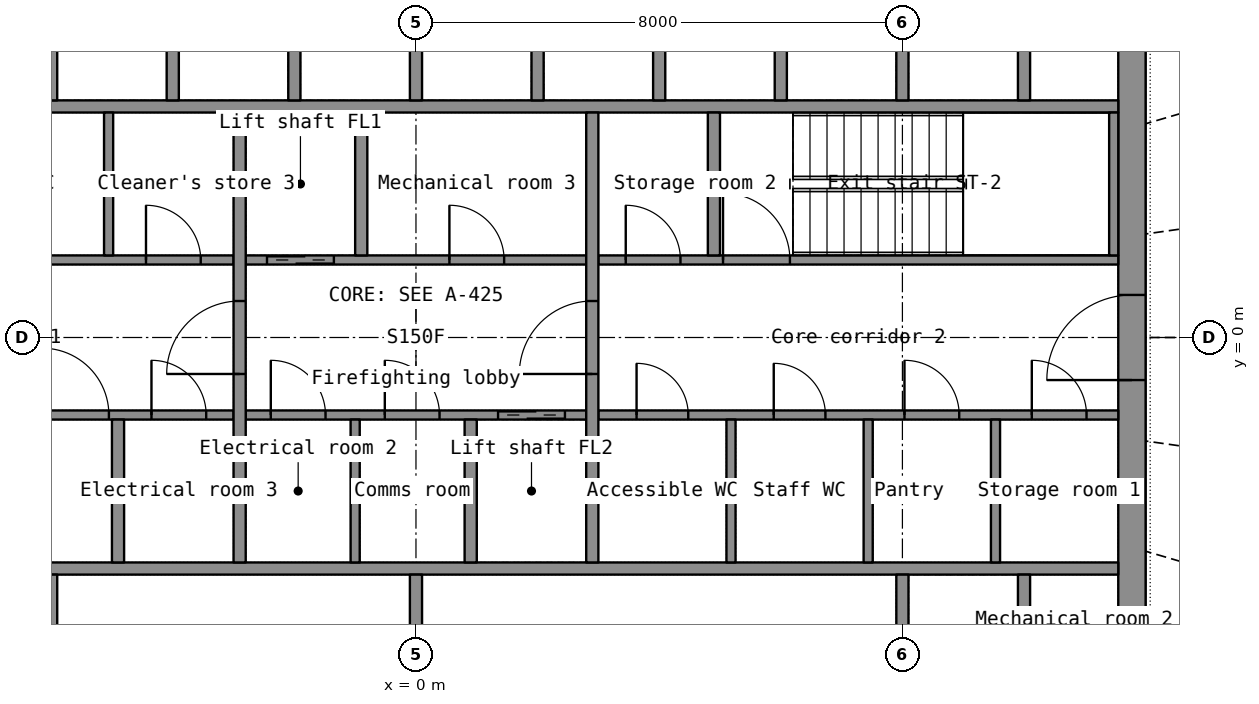
"""IFC4 building model, lengths in metres.
Left out: names, types, materials, properties, quantities, classifications, styles, units other than length and angle.
Written with IfcOpenShell. Run it as: python <this file> out.ifc"""

import sys

from ifc_helpers import new_model, si_unit, direction, frame, frame_2d, origin, place, context, subcontext, project, spatial, rectangle, extrude, element, fill, save


model = new_model("IFC4")
c1 = context("Model", 3, precision=1e-05, world=origin(), true_north=direction((0.0, 1.0)))
c2 = subcontext(c1, "Body", "Model", "MODEL_VIEW")
j1 = project(units=[si_unit("LENGTHUNIT", "METRE"), si_unit("PLANEANGLEUNIT", "RADIAN")], contexts=[c1])
p1 = place(None, origin())
s1 = spatial("IfcSite", under=j1, at=p1, CompositionType="ELEMENT")
p2 = place(p1, origin())
s2 = spatial("IfcBuilding", under=s1, at=p2, CompositionType="ELEMENT")
p3 = place(p2, frame((0.0, 0.0, 197.8)))
s3 = spatial("IfcBuildingStorey", under=s2, at=p3, CompositionType="ELEMENT", Elevation=197.8)
p4 = place(p3, frame((11.775, -7.2, 0.0), z_axis=(0.0, 0.0, 1.0), x_axis=(0.0, 1.0, 0.0)))
e1 = element("IfcWall", 1, at=p4, inside=s3, PredefinedType="SHEAR", context=c2, shape_type="SweptSolid", body=[
    extrude(rectangle(XDim=14.4, YDim=0.45, at=frame_2d((7.2, 0.0))), origin(), (0.0, 0.0, 1.0), 3.3),
])
p5 = place(p4, frame((6.5, 0.0, 0.0)))
e2 = element("IfcOpeningElement", 2, at=p5, cuts=e1, PredefinedType="OPENING", context=c2, shape_type="SweptSolid", body=[
    extrude(rectangle(XDim=1.4, YDim=2.2, at=frame_2d((0.7, 1.1))), frame((0.0, 0.235, 0.0), z_axis=(0.0, -1.0, 0.0), x_axis=(1.0, 0.0, 0.0)), (0.0, 0.0, 1.0), 0.47),
])
for number, where, z_axis, x_axis in (
    (3, (-11.55, -3.8, 0.0), (0.0, 0.0, 1.0), (1.0, 0.0, 0.0)),
    (4, (-11.55, 3.8, 0.0), (0.0, 0.0, 1.0), (1.0, 0.0, 0.0)),
):
    element("IfcWall", number, at=place(p3, frame(where, z_axis=z_axis, x_axis=x_axis)), inside=s3, PredefinedType="SHEAR", context=c2, shape_type="SweptSolid", body=[
        extrude(rectangle(XDim=23.1, YDim=0.2, at=frame_2d((11.55, 0.0))), origin(), (0.0, 0.0, 1.0), 3.3),
    ])
for number, where, z_axis, x_axis in (
    (5, (8.0, -6.75, 0.0), (0.0, 0.0, 1.0), (0.0, 1.0, 0.0)),
    (6, (10.0, -6.75, 0.0), (0.0, 0.0, 1.0), (0.0, 1.0, 0.0)),
):
    element("IfcWall", number, at=place(p3, frame(where, z_axis=z_axis, x_axis=x_axis)), inside=s3, PredefinedType="SHEAR", context=c2, shape_type="SweptSolid", body=[
        extrude(rectangle(XDim=2.85, YDim=0.2, at=frame_2d((1.425, 0.0))), origin(), (0.0, 0.0, 1.0), 3.3),
    ])
for number, where, z_axis, x_axis in (
    (7, (-6.0, -6.75, 0.0), (0.0, 0.0, 1.0), (0.0, 1.0, 0.0)),
    (8, (0.0, -6.75, 0.0), (0.0, 0.0, 1.0), (0.0, 1.0, 0.0)),
):
    element("IfcWall", number, at=place(p3, frame(where, z_axis=z_axis, x_axis=x_axis)), inside=s3, PredefinedType="PARTITIONING", context=c2, shape_type="SweptSolid", body=[
        extrude(rectangle(XDim=2.85, YDim=0.2, at=frame_2d((1.425, 0.0))), origin(), (0.0, 0.0, 1.0), 3.3),
    ])
for number, where, z_axis, x_axis in (
    (9, (-6.0, 3.9, 0.0), (0.0, 0.0, 1.0), (0.0, 1.0, 0.0)),
    (10, (-4.0, 3.9, 0.0), (0.0, 0.0, 1.0), (0.0, 1.0, 0.0)),
    (11, (-2.0, 3.9, 0.0), (0.0, 0.0, 1.0), (0.0, 1.0, 0.0)),
    (12, (0.0, 3.9, 0.0), (0.0, 0.0, 1.0), (0.0, 1.0, 0.0)),
    (13, (2.0, 3.9, 0.0), (0.0, 0.0, 1.0), (0.0, 1.0, 0.0)),
    (14, (4.0, 3.9, 0.0), (0.0, 0.0, 1.0), (0.0, 1.0, 0.0)),
    (15, (6.0, 3.9, 0.0), (0.0, 0.0, 1.0), (0.0, 1.0, 0.0)),
    (16, (8.0, 3.9, 0.0), (0.0, 0.0, 1.0), (0.0, 1.0, 0.0)),
    (17, (10.0, 3.9, 0.0), (0.0, 0.0, 1.0), (0.0, 1.0, 0.0)),
):
    element("IfcWall", number, at=place(p3, frame(where, z_axis=z_axis, x_axis=x_axis)), inside=s3, PredefinedType="SHEAR", context=c2, shape_type="SweptSolid", body=[
        extrude(rectangle(XDim=2.85, YDim=0.2, at=frame_2d((1.425, 0.0))), origin(), (0.0, 0.0, 1.0), 3.3),
    ])
p6 = place(p3, frame((-11.55, -1.275, 0.0), z_axis=(0.0, 0.0, 1.0), x_axis=(1.0, 0.0, 0.0)))
e18 = element("IfcWall", 18, at=p6, inside=s3, PredefinedType="SHEAR", context=c2, shape_type="SweptSolid", body=[
    extrude(rectangle(XDim=8.55, YDim=0.15, at=frame_2d((4.275, 0.0))), origin(), (0.0, 0.0, 1.0), 3.3),
])
p7 = place(p6, frame((5.4, 0.0, 0.0)))
e19 = element("IfcOpeningElement", 19, at=p7, cuts=e18, PredefinedType="OPENING", context=c2, shape_type="SweptSolid", body=[
    extrude(rectangle(XDim=1.1, YDim=2.15, at=frame_2d((0.55, 1.075))), frame((0.0, 0.085, 0.0), z_axis=(0.0, -1.0, 0.0), x_axis=(1.0, 0.0, 0.0)), (0.0, 0.0, 1.0), 0.17),
])
p8 = place(p6, frame((7.2, 0.0, 0.0)))
e20 = element("IfcOpeningElement", 20, at=p8, cuts=e18, PredefinedType="OPENING", context=c2, shape_type="SweptSolid", body=[
    extrude(rectangle(XDim=0.9, YDim=2.1, at=frame_2d((0.45, 1.05))), frame((0.0, 0.085, 0.0), z_axis=(0.0, -1.0, 0.0), x_axis=(1.0, 0.0, 0.0)), (0.0, 0.0, 1.0), 0.17),
])
p9 = place(p3, frame((-2.8, -1.275, 0.0), z_axis=(0.0, 0.0, 1.0), x_axis=(1.0, 0.0, 0.0)))
e21 = element("IfcWall", 21, at=p9, inside=s3, PredefinedType="SHEAR", context=c2, shape_type="SweptSolid", body=[
    extrude(rectangle(XDim=5.6, YDim=0.15, at=frame_2d((2.8, 0.0))), origin(), (0.0, 0.0, 1.0), 3.3),
])
p10 = place(p9, frame((4.15, 0.0, 0.0)))
e22 = element("IfcOpeningElement", 22, at=p10, cuts=e21, PredefinedType="OPENING", context=c2, shape_type="SweptSolid", body=[
    extrude(rectangle(XDim=1.1, YDim=2.2, at=frame_2d((0.55, 1.1))), frame((0.0, 0.085, 0.0), z_axis=(0.0, -1.0, 0.0), x_axis=(1.0, 0.0, 0.0)), (0.0, 0.0, 1.0), 0.17),
])
p11 = place(p9, frame((0.413, 0.0, 0.0)))
e23 = element("IfcOpeningElement", 23, at=p11, cuts=e21, PredefinedType="OPENING", context=c2, shape_type="SweptSolid", body=[
    extrude(rectangle(XDim=0.9, YDim=2.1, at=frame_2d((0.45, 1.05))), frame((0.0, 0.085, 0.0), z_axis=(0.0, -1.0, 0.0), x_axis=(1.0, 0.0, 0.0)), (0.0, 0.0, 1.0), 0.17),
])
p12 = place(p9, frame((2.288, 0.0, 0.0)))
e24 = element("IfcOpeningElement", 24, at=p12, cuts=e21, PredefinedType="OPENING", context=c2, shape_type="SweptSolid", body=[
    extrude(rectangle(XDim=0.9, YDim=2.1, at=frame_2d((0.45, 1.05))), frame((0.0, 0.085, 0.0), z_axis=(0.0, -1.0, 0.0), x_axis=(1.0, 0.0, 0.0)), (0.0, 0.0, 1.0), 0.17),
])
p13 = place(p3, frame((3.0, -1.275, 0.0), z_axis=(0.0, 0.0, 1.0), x_axis=(1.0, 0.0, 0.0)))
e25 = element("IfcWall", 25, at=p13, inside=s3, PredefinedType="PARTITIONING", context=c2, shape_type="SweptSolid", body=[
    extrude(rectangle(XDim=8.55, YDim=0.15, at=frame_2d((4.275, 0.0))), origin(), (0.0, 0.0, 1.0), 3.3),
])
p14 = place(p13, frame((0.628, 0.0, 0.0)))
e26 = element("IfcOpeningElement", 26, at=p14, cuts=e25, PredefinedType="OPENING", context=c2, shape_type="SweptSolid", body=[
    extrude(rectangle(XDim=0.85, YDim=2.1, at=frame_2d((0.425, 1.05))), frame((0.0, 0.085, 0.0), z_axis=(0.0, -1.0, 0.0), x_axis=(1.0, 0.0, 0.0)), (0.0, 0.0, 1.0), 0.17),
])
p15 = place(p13, frame((2.884, 0.0, 0.0)))
e27 = element("IfcOpeningElement", 27, at=p15, cuts=e25, PredefinedType="OPENING", context=c2, shape_type="SweptSolid", body=[
    extrude(rectangle(XDim=0.85, YDim=2.1, at=frame_2d((0.425, 1.05))), frame((0.0, 0.085, 0.0), z_axis=(0.0, -1.0, 0.0), x_axis=(1.0, 0.0, 0.0)), (0.0, 0.0, 1.0), 0.17),
])
p16 = place(p13, frame((5.034, 0.0, 0.0)))
e28 = element("IfcOpeningElement", 28, at=p16, cuts=e25, PredefinedType="OPENING", context=c2, shape_type="SweptSolid", body=[
    extrude(rectangle(XDim=0.9, YDim=2.1, at=frame_2d((0.45, 1.05))), frame((0.0, 0.085, 0.0), z_axis=(0.0, -1.0, 0.0), x_axis=(1.0, 0.0, 0.0)), (0.0, 0.0, 1.0), 0.17),
])
p17 = place(p13, frame((7.128, 0.0, 0.0)))
e29 = element("IfcOpeningElement", 29, at=p17, cuts=e25, PredefinedType="OPENING", context=c2, shape_type="SweptSolid", body=[
    extrude(rectangle(XDim=0.9, YDim=2.1, at=frame_2d((0.45, 1.05))), frame((0.0, 0.085, 0.0), z_axis=(0.0, -1.0, 0.0), x_axis=(1.0, 0.0, 0.0)), (0.0, 0.0, 1.0), 0.17),
])
p18 = place(p3, frame((-11.55, 1.275, 0.0), z_axis=(0.0, 0.0, 1.0), x_axis=(1.0, 0.0, 0.0)))
e30 = element("IfcWall", 30, at=p18, inside=s3, PredefinedType="PARTITIONING", context=c2, shape_type="SweptSolid", body=[
    extrude(rectangle(XDim=8.55, YDim=0.15, at=frame_2d((4.275, 0.0))), origin(), (0.0, 0.0, 1.0), 3.3),
])
p19 = place(p18, frame((1.143, 0.0, 0.0)))
e31 = element("IfcOpeningElement", 31, at=p19, cuts=e30, PredefinedType="OPENING", context=c2, shape_type="SweptSolid", body=[
    extrude(rectangle(XDim=0.85, YDim=2.1, at=frame_2d((0.425, 1.05))), frame((0.0, 0.085, 0.0), z_axis=(0.0, -1.0, 0.0), x_axis=(1.0, 0.0, 0.0)), (0.0, 0.0, 1.0), 0.17),
])
p20 = place(p18, frame((4.427, 0.0, 0.0)))
e32 = element("IfcOpeningElement", 32, at=p20, cuts=e30, PredefinedType="OPENING", context=c2, shape_type="SweptSolid", body=[
    extrude(rectangle(XDim=0.85, YDim=2.1, at=frame_2d((0.425, 1.05))), frame((0.0, 0.085, 0.0), z_axis=(0.0, -1.0, 0.0), x_axis=(1.0, 0.0, 0.0)), (0.0, 0.0, 1.0), 0.17),
])
p21 = place(p18, frame((7.11, 0.0, 0.0)))
e33 = element("IfcOpeningElement", 33, at=p21, cuts=e30, PredefinedType="OPENING", context=c2, shape_type="SweptSolid", body=[
    extrude(rectangle(XDim=0.9, YDim=2.1, at=frame_2d((0.45, 1.05))), frame((0.0, 0.085, 0.0), z_axis=(0.0, -1.0, 0.0), x_axis=(1.0, 0.0, 0.0)), (0.0, 0.0, 1.0), 0.17),
])
p22 = place(p3, frame((-2.8, 1.275, 0.0), z_axis=(0.0, 0.0, 1.0), x_axis=(1.0, 0.0, 0.0)))
e34 = element("IfcWall", 34, at=p22, inside=s3, PredefinedType="SHEAR", context=c2, shape_type="SweptSolid", body=[
    extrude(rectangle(XDim=5.6, YDim=0.15, at=frame_2d((2.8, 0.0))), origin(), (0.0, 0.0, 1.0), 3.3),
])
p23 = place(p22, frame((0.35, 0.0, 0.0)))
e35 = element("IfcOpeningElement", 35, at=p23, cuts=e34, PredefinedType="OPENING", context=c2, shape_type="SweptSolid", body=[
    extrude(rectangle(XDim=1.1, YDim=2.2, at=frame_2d((0.55, 1.1))), frame((0.0, 0.085, 0.0), z_axis=(0.0, -1.0, 0.0), x_axis=(1.0, 0.0, 0.0)), (0.0, 0.0, 1.0), 0.17),
])
p24 = place(p22, frame((3.35, 0.0, 0.0)))
e36 = element("IfcOpeningElement", 36, at=p24, cuts=e34, PredefinedType="OPENING", context=c2, shape_type="SweptSolid", body=[
    extrude(rectangle(XDim=0.9, YDim=2.1, at=frame_2d((0.45, 1.05))), frame((0.0, 0.085, 0.0), z_axis=(0.0, -1.0, 0.0), x_axis=(1.0, 0.0, 0.0)), (0.0, 0.0, 1.0), 0.17),
])
p25 = place(p3, frame((3.0, 1.275, 0.0), z_axis=(0.0, 0.0, 1.0), x_axis=(1.0, 0.0, 0.0)))
e37 = element("IfcWall", 37, at=p25, inside=s3, PredefinedType="SHEAR", context=c2, shape_type="SweptSolid", body=[
    extrude(rectangle(XDim=8.55, YDim=0.15, at=frame_2d((4.275, 0.0))), origin(), (0.0, 0.0, 1.0), 3.3),
])
p26 = place(p25, frame((2.05, 0.0, 0.0)))
e38 = element("IfcOpeningElement", 38, at=p26, cuts=e37, PredefinedType="OPENING", context=c2, shape_type="SweptSolid", body=[
    extrude(rectangle(XDim=1.1, YDim=2.15, at=frame_2d((0.55, 1.075))), frame((0.0, 0.085, 0.0), z_axis=(0.0, -1.0, 0.0), x_axis=(1.0, 0.0, 0.0)), (0.0, 0.0, 1.0), 0.17),
])
p27 = place(p25, frame((0.45, 0.0, 0.0)))
e39 = element("IfcOpeningElement", 39, at=p27, cuts=e37, PredefinedType="OPENING", context=c2, shape_type="SweptSolid", body=[
    extrude(rectangle(XDim=0.9, YDim=2.1, at=frame_2d((0.45, 1.05))), frame((0.0, 0.085, 0.0), z_axis=(0.0, -1.0, 0.0), x_axis=(1.0, 0.0, 0.0)), (0.0, 0.0, 1.0), 0.17),
])
p28 = place(p3, frame((-2.9, -3.7, 0.0), z_axis=(0.0, 0.0, 1.0), x_axis=(0.0, 1.0, 0.0)))
e40 = element("IfcWall", 40, at=p28, inside=s3, PredefinedType="SHEAR", context=c2, shape_type="SweptSolid", body=[
    extrude(rectangle(XDim=7.4, YDim=0.2, at=frame_2d((3.7, 0.0))), origin(), (0.0, 0.0, 1.0), 3.3),
])
p29 = place(p28, frame((3.1, 0.0, 0.0)))
e41 = element("IfcOpeningElement", 41, at=p29, cuts=e40, PredefinedType="OPENING", context=c2, shape_type="SweptSolid", body=[
    extrude(rectangle(XDim=1.2, YDim=2.2, at=frame_2d((0.6, 1.1))), frame((0.0, 0.11, 0.0), z_axis=(0.0, -1.0, 0.0), x_axis=(1.0, 0.0, 0.0)), (0.0, 0.0, 1.0), 0.22),
])
p30 = place(p3, frame((2.9, -3.7, 0.0), z_axis=(0.0, 0.0, 1.0), x_axis=(0.0, 1.0, 0.0)))
e42 = element("IfcWall", 42, at=p30, inside=s3, PredefinedType="SHEAR", context=c2, shape_type="SweptSolid", body=[
    extrude(rectangle(XDim=7.4, YDim=0.2, at=frame_2d((3.7, 0.0))), origin(), (0.0, 0.0, 1.0), 3.3),
])
p31 = place(p30, frame((3.1, 0.0, 0.0)))
e43 = element("IfcOpeningElement", 43, at=p31, cuts=e42, PredefinedType="OPENING", context=c2, shape_type="SweptSolid", body=[
    extrude(rectangle(XDim=1.2, YDim=2.2, at=frame_2d((0.6, 1.1))), frame((0.0, 0.11, 0.0), z_axis=(0.0, -1.0, 0.0), x_axis=(1.0, 0.0, 0.0)), (0.0, 0.0, 1.0), 0.22),
])
for number, where, z_axis, x_axis in (
    (44, (-0.9, 1.35, 0.0), (0.0, 0.0, 1.0), (0.0, 1.0, 0.0)),
    (45, (0.9, -3.7, 0.0), (0.0, 0.0, 1.0), (0.0, 1.0, 0.0)),
):
    element("IfcWall", number, at=place(p3, frame(where, z_axis=z_axis, x_axis=x_axis)), inside=s3, PredefinedType="SHEAR", context=c2, shape_type="SweptSolid", body=[
        extrude(rectangle(XDim=2.35, YDim=0.2, at=frame_2d((1.175, 0.0))), origin(), (0.0, 0.0, 1.0), 3.3),
    ])
p32 = place(p3, frame((11.475, 1.35, 0.0), z_axis=(0.0, 0.0, 1.0), x_axis=(0.0, 1.0, 0.0)))
e46 = element("IfcWall", 46, at=p32, inside=s3, PredefinedType="SHEAR", context=c2, shape_type="SweptSolid", body=[
    extrude(rectangle(XDim=2.35, YDim=0.15, at=frame_2d((1.175, 0.0))), origin(), (0.0, 0.0, 1.0), 3.3),
])
for number, where, z_axis, x_axis in (
    (47, (-4.9, -3.7, 0.0), (0.0, 0.0, 1.0), (0.0, 1.0, 0.0)),
    (48, (4.9, 1.35, 0.0), (0.0, 0.0, 1.0), (0.0, 1.0, 0.0)),
):
    element("IfcWall", number, at=place(p3, frame(where, z_axis=z_axis, x_axis=x_axis)), inside=s3, PredefinedType="SHEAR", context=c2, shape_type="SweptSolid", body=[
        extrude(rectangle(XDim=2.35, YDim=0.2, at=frame_2d((1.175, 0.0))), origin(), (0.0, 0.0, 1.0), 3.3),
    ])
for number, where, z_axis, x_axis in (
    (49, (-5.055, 1.35, 0.0), (0.0, 0.0, 1.0), (0.0, 1.0, 0.0)),
    (50, (5.181, -3.7, 0.0), (0.0, 0.0, 1.0), (0.0, 1.0, 0.0)),
    (51, (7.437, -3.7, 0.0), (0.0, 0.0, 1.0), (0.0, 1.0, 0.0)),
    (52, (9.531, -3.7, 0.0), (0.0, 0.0, 1.0), (0.0, 1.0, 0.0)),
    (53, (-1.0, -3.7, 0.0), (0.0, 0.0, 1.0), (0.0, 1.0, 0.0)),
):
    element("IfcWall", number, at=place(p3, frame(where, z_axis=z_axis, x_axis=x_axis)), inside=s3, PredefinedType="PARTITIONING", context=c2, shape_type="SweptSolid", body=[
        extrude(rectangle(XDim=2.35, YDim=0.15, at=frame_2d((1.175, 0.0))), origin(), (0.0, 0.0, 1.0), 3.3),
    ])
p33 = place(p5, origin())
e54 = element("IfcDoor", 54, at=p33, inside=s3, OperationType="DOUBLE_DOOR_SINGLE_SWING", PredefinedType="DOOR", context=c2, shape_type="SweptSolid", body=[
    extrude(rectangle(XDim=1.4, YDim=2.2, at=frame_2d((0.7, 1.1))), frame((0.0, 0.025, 0.0), z_axis=(0.0, -1.0, 0.0), x_axis=(1.0, 0.0, 0.0)), (0.0, 0.0, 1.0), 0.05),
])
fill(e2, e54)
p34 = place(p29, origin())
e55 = element("IfcDoor", 55, at=p34, inside=s3, OperationType="SINGLE_SWING_LEFT", PredefinedType="DOOR", context=c2, shape_type="SweptSolid", body=[
    extrude(rectangle(XDim=1.2, YDim=2.2, at=frame_2d((0.6, 1.1))), frame((0.0, 0.025, 0.0), z_axis=(0.0, -1.0, 0.0), x_axis=(1.0, 0.0, 0.0)), (0.0, 0.0, 1.0), 0.05),
])
fill(e41, e55)
p35 = place(p31, origin())
e56 = element("IfcDoor", 56, at=p35, inside=s3, OperationType="SINGLE_SWING_LEFT", PredefinedType="DOOR", context=c2, shape_type="SweptSolid", body=[
    extrude(rectangle(XDim=1.2, YDim=2.2, at=frame_2d((0.6, 1.1))), frame((0.0, 0.025, 0.0), z_axis=(0.0, -1.0, 0.0), x_axis=(1.0, 0.0, 0.0)), (0.0, 0.0, 1.0), 0.05),
])
fill(e43, e56)
p36 = place(p23, origin())
e57 = element("IfcDoor", 57, at=p36, inside=s3, OperationType="DOUBLE_DOOR_SLIDING", PredefinedType="DOOR", context=c2, shape_type="SweptSolid", body=[
    extrude(rectangle(XDim=1.1, YDim=2.2, at=frame_2d((0.55, 1.1))), frame((0.0, 0.025, 0.0), z_axis=(0.0, -1.0, 0.0), x_axis=(1.0, 0.0, 0.0)), (0.0, 0.0, 1.0), 0.05),
])
fill(e35, e57)
p37 = place(p10, origin())
e58 = element("IfcDoor", 58, at=p37, inside=s3, OperationType="DOUBLE_DOOR_SLIDING", PredefinedType="DOOR", context=c2, shape_type="SweptSolid", body=[
    extrude(rectangle(XDim=1.1, YDim=2.2, at=frame_2d((0.55, 1.1))), frame((0.0, 0.025, 0.0), z_axis=(0.0, -1.0, 0.0), x_axis=(1.0, 0.0, 0.0)), (0.0, 0.0, 1.0), 0.05),
])
fill(e22, e58)
p38 = place(p7, origin())
e59 = element("IfcDoor", 59, at=p38, inside=s3, OperationType="SINGLE_SWING_LEFT", PredefinedType="DOOR", context=c2, shape_type="SweptSolid", body=[
    extrude(rectangle(XDim=1.1, YDim=2.15, at=frame_2d((0.55, 1.075))), frame((0.0, 0.025, 0.0), z_axis=(0.0, -1.0, 0.0), x_axis=(1.0, 0.0, 0.0)), (0.0, 0.0, 1.0), 0.05),
])
fill(e19, e59)
p39 = place(p26, origin())
e60 = element("IfcDoor", 60, at=p39, inside=s3, OperationType="SINGLE_SWING_LEFT", PredefinedType="DOOR", context=c2, shape_type="SweptSolid", body=[
    extrude(rectangle(XDim=1.1, YDim=2.15, at=frame_2d((0.55, 1.075))), frame((0.0, 0.025, 0.0), z_axis=(0.0, -1.0, 0.0), x_axis=(1.0, 0.0, 0.0)), (0.0, 0.0, 1.0), 0.05),
])
fill(e38, e60)
p40 = place(p21, origin())
e61 = element("IfcDoor", 61, at=p40, inside=s3, OperationType="SINGLE_SWING_LEFT", PredefinedType="DOOR", context=c2, shape_type="SweptSolid", body=[
    extrude(rectangle(XDim=0.9, YDim=2.1, at=frame_2d((0.45, 1.05))), frame((0.0, 0.025, 0.0), z_axis=(0.0, -1.0, 0.0), x_axis=(1.0, 0.0, 0.0)), (0.0, 0.0, 1.0), 0.05),
])
fill(e33, e61)
p41 = place(p14, origin())
e62 = element("IfcDoor", 62, at=p41, inside=s3, OperationType="SINGLE_SWING_LEFT", PredefinedType="DOOR", context=c2, shape_type="SweptSolid", body=[
    extrude(rectangle(XDim=0.85, YDim=2.1, at=frame_2d((0.425, 1.05))), frame((0.0, 0.025, 0.0), z_axis=(0.0, -1.0, 0.0), x_axis=(1.0, 0.0, 0.0)), (0.0, 0.0, 1.0), 0.05),
])
fill(e26, e62)
p42 = place(p15, origin())
e63 = element("IfcDoor", 63, at=p42, inside=s3, OperationType="SINGLE_SWING_LEFT", PredefinedType="DOOR", context=c2, shape_type="SweptSolid", body=[
    extrude(rectangle(XDim=0.85, YDim=2.1, at=frame_2d((0.425, 1.05))), frame((0.0, 0.025, 0.0), z_axis=(0.0, -1.0, 0.0), x_axis=(1.0, 0.0, 0.0)), (0.0, 0.0, 1.0), 0.05),
])
fill(e27, e63)
p43 = place(p16, origin())
e64 = element("IfcDoor", 64, at=p43, inside=s3, OperationType="SINGLE_SWING_LEFT", PredefinedType="DOOR", context=c2, shape_type="SweptSolid", body=[
    extrude(rectangle(XDim=0.9, YDim=2.1, at=frame_2d((0.45, 1.05))), frame((0.0, 0.025, 0.0), z_axis=(0.0, -1.0, 0.0), x_axis=(1.0, 0.0, 0.0)), (0.0, 0.0, 1.0), 0.05),
])
fill(e28, e64)
p44 = place(p17, origin())
e65 = element("IfcDoor", 65, at=p44, inside=s3, OperationType="SINGLE_SWING_LEFT", PredefinedType="DOOR", context=c2, shape_type="SweptSolid", body=[
    extrude(rectangle(XDim=0.9, YDim=2.1, at=frame_2d((0.45, 1.05))), frame((0.0, 0.025, 0.0), z_axis=(0.0, -1.0, 0.0), x_axis=(1.0, 0.0, 0.0)), (0.0, 0.0, 1.0), 0.05),
])
fill(e29, e65)
p45 = place(p24, origin())
e66 = element("IfcDoor", 66, at=p45, inside=s3, OperationType="SINGLE_SWING_LEFT", PredefinedType="DOOR", context=c2, shape_type="SweptSolid", body=[
    extrude(rectangle(XDim=0.9, YDim=2.1, at=frame_2d((0.45, 1.05))), frame((0.0, 0.025, 0.0), z_axis=(0.0, -1.0, 0.0), x_axis=(1.0, 0.0, 0.0)), (0.0, 0.0, 1.0), 0.05),
])
fill(e36, e66)
p46 = place(p11, origin())
e67 = element("IfcDoor", 67, at=p46, inside=s3, OperationType="SINGLE_SWING_LEFT", PredefinedType="DOOR", context=c2, shape_type="SweptSolid", body=[
    extrude(rectangle(XDim=0.9, YDim=2.1, at=frame_2d((0.45, 1.05))), frame((0.0, 0.025, 0.0), z_axis=(0.0, -1.0, 0.0), x_axis=(1.0, 0.0, 0.0)), (0.0, 0.0, 1.0), 0.05),
])
fill(e23, e67)
p47 = place(p12, origin())
e68 = element("IfcDoor", 68, at=p47, inside=s3, OperationType="SINGLE_SWING_LEFT", PredefinedType="DOOR", context=c2, shape_type="SweptSolid", body=[
    extrude(rectangle(XDim=0.9, YDim=2.1, at=frame_2d((0.45, 1.05))), frame((0.0, 0.025, 0.0), z_axis=(0.0, -1.0, 0.0), x_axis=(1.0, 0.0, 0.0)), (0.0, 0.0, 1.0), 0.05),
])
fill(e24, e68)
p48 = place(p27, origin())
e69 = element("IfcDoor", 69, at=p48, inside=s3, OperationType="SINGLE_SWING_LEFT", PredefinedType="DOOR", context=c2, shape_type="SweptSolid", body=[
    extrude(rectangle(XDim=0.9, YDim=2.1, at=frame_2d((0.45, 1.05))), frame((0.0, 0.025, 0.0), z_axis=(0.0, -1.0, 0.0), x_axis=(1.0, 0.0, 0.0)), (0.0, 0.0, 1.0), 0.05),
])
fill(e39, e69)
p49 = place(p8, origin())
e70 = element("IfcDoor", 70, at=p49, inside=s3, OperationType="SINGLE_SWING_LEFT", PredefinedType="DOOR", context=c2, shape_type="SweptSolid", body=[
    extrude(rectangle(XDim=0.9, YDim=2.1, at=frame_2d((0.45, 1.05))), frame((0.0, 0.025, 0.0), z_axis=(0.0, -1.0, 0.0), x_axis=(1.0, 0.0, 0.0)), (0.0, 0.0, 1.0), 0.05),
])
fill(e20, e70)
save(model, sys.argv[1])
